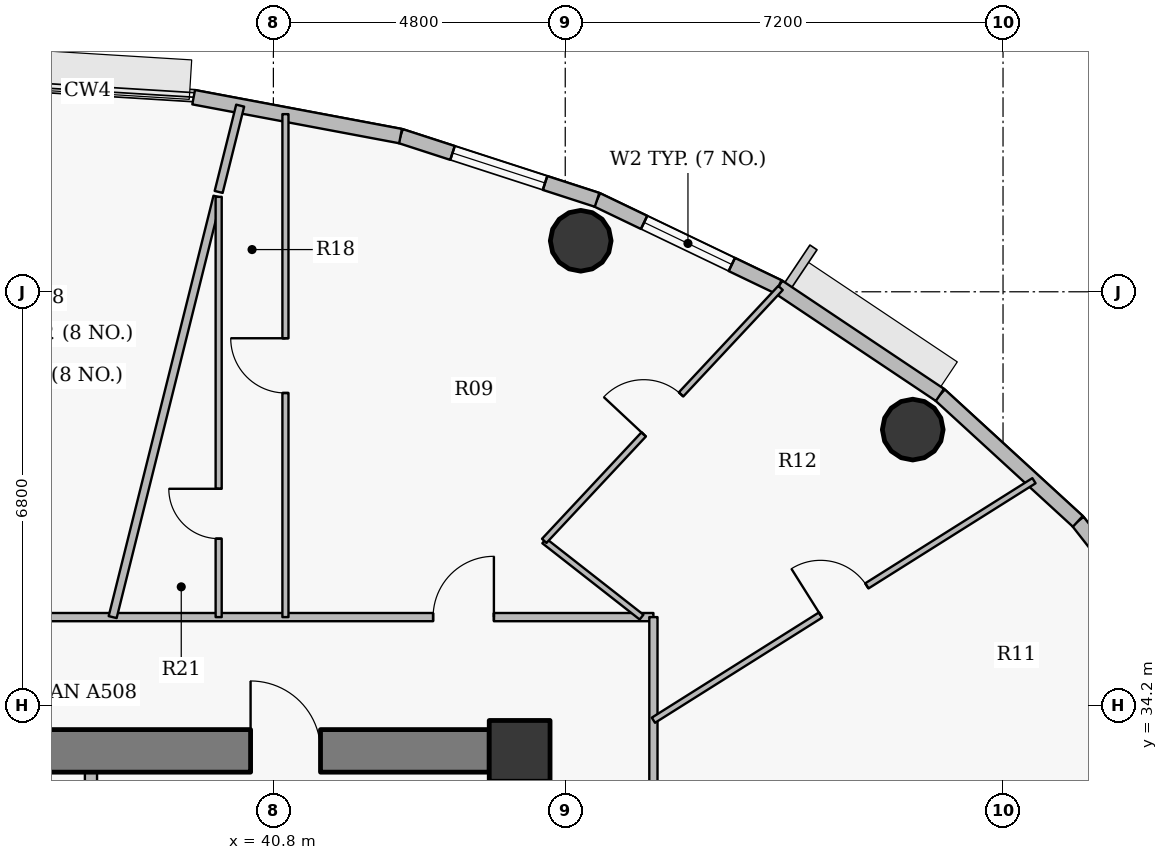
"""IFC4 building model, lengths in metres.
Left out: names, types, materials, properties, quantities, classifications, styles, units other than length and angle.
Written with IfcOpenShell. Run it as: python <this file> out.ifc"""

import sys

from ifc_helpers import new_model, si_unit, direction, frame, frame_2d, origin, origin_2d, place, context, subcontext, project, spatial, rectangle, hollow_circle, extrude, source, transform, mapped, element, fill, save


model = new_model("IFC4")
c1 = context("Model", 3, precision=1e-05, world=origin(), true_north=direction((0.0, 1.0)))
c2 = subcontext(c1, "Body", "Model", "MODEL_VIEW")
j1 = project(units=[si_unit("LENGTHUNIT", "METRE"), si_unit("PLANEANGLEUNIT", "RADIAN")], contexts=[c1])
p1 = place(None, origin())
s1 = spatial("IfcSite", under=j1, at=p1, CompositionType="ELEMENT")
p2 = place(p1, origin())
s2 = spatial("IfcBuilding", under=s1, at=p2, CompositionType="ELEMENT")
p3 = place(p2, frame((0.0, 0.0, 295.5)))
s3 = spatial("IfcBuildingStorey", under=s2, at=p3, CompositionType="ELEMENT", Elevation=295.5)
p4 = place(p3, frame((44.85, 33.45, 0.0), z_axis=(0.0, 0.0, 1.0), x_axis=(1.0, 0.0, 0.0)))
e1 = element("IfcColumn", 1, at=p4, inside=s3, PredefinedType="COLUMN", context=c2, shape_type="SweptSolid", body=[
    extrude(rectangle(XDim=1.0, YDim=1.0, at=origin_2d()), origin(), (0.0, 0.0, 1.0), 3.75),
])
p5 = place(p3, frame((27.65, 33.45, 0.0), z_axis=(0.0, 0.0, 1.0), x_axis=(1.0, 0.0, 0.0)))
e2 = element("IfcWall", 2, at=p5, inside=s3, PredefinedType="SHEAR", context=c2, shape_type="SweptSolid", body=[
    extrude(rectangle(XDim=16.7, YDim=0.7, at=frame_2d((8.35, 0.0))), origin(), (0.0, 0.0, 1.0), 3.05),
])
p6 = place(p5, frame((12.775, 0.0, 0.0)))
e3 = element("IfcOpeningElement", 3, at=p6, cuts=e2, PredefinedType="OPENING", context=c2, shape_type="SweptSolid", body=[
    extrude(rectangle(XDim=1.15, YDim=2.15, at=origin_2d()), frame((0.575, 0.36, 1.075), z_axis=(0.0, -1.0, 0.0), x_axis=(1.0, 0.0, 0.0)), (0.0, 0.0, 1.0), 0.72),
])
for number, where, z_axis, x_axis in (
    (4, (51.315, 38.733, 0.0), (0.0, 0.0, 1.0), (1.0, 0.0, 0.0)),
    (5, (45.854, 41.839, 0.0), (0.0, 0.0, 1.0), (1.0, 0.0, 0.0)),
):
    element("IfcColumn", number, at=place(p3, frame(where, z_axis=z_axis, x_axis=x_axis)), inside=s3, PredefinedType="COLUMN", context=c2, shape_type="SweptSolid", body=[
        extrude(hollow_circle(Radius=0.5, WallThickness=0.032, at=origin_2d()), origin(), (0.0, 0.0, 1.0), 3.75),
    ])
p7 = place(p3, frame((54.03, 37.225, 0.0), z_axis=(0.0, 0.0, 1.0), x_axis=(0.616337186556, -0.787482363275, 0.0)))
e6 = element("IfcWall", 6, at=p7, inside=s3, PredefinedType="SOLIDWALL", context=c2, shape_type="SweptSolid", body=[
    extrude(rectangle(XDim=2.958, YDim=0.24, at=frame_2d((1.479, 0.0))), origin(), (0.0, 0.0, 1.0), 3.5),
])
p8 = place(p7, frame((0.854, 0.0, 0.9)))
e7 = element("IfcOpeningElement", 7, at=p8, cuts=e6, PredefinedType="OPENING", context=c2, shape_type="SweptSolid", body=[
    extrude(rectangle(XDim=1.25, YDim=1.65, at=origin_2d()), frame((0.625, 0.13, 0.825), z_axis=(0.0, -1.0, 0.0), x_axis=(1.0, 0.0, 0.0)), (0.0, 0.0, 1.0), 0.26),
])
p9 = place(p3, frame((51.762, 39.304, 0.0), z_axis=(0.0, 0.0, 1.0), x_axis=(0.737068506972, -0.675818034703, 0.0)))
e8 = element("IfcWall", 8, at=p9, inside=s3, PredefinedType="SOLIDWALL", context=c2, shape_type="SweptSolid", body=[
    extrude(rectangle(XDim=3.077, YDim=0.24, at=frame_2d((1.539, 0.0))), origin(), (0.0, 0.0, 1.0), 3.5),
])
p10 = place(p3, frame((49.104, 41.082, 0.0), z_axis=(0.0, 0.0, 1.0), x_axis=(0.831250592635, -0.55589787933, 0.0)))
e9 = element("IfcWall", 9, at=p10, inside=s3, PredefinedType="SOLIDWALL", context=c2, shape_type="SweptSolid", body=[
    extrude(rectangle(XDim=3.197, YDim=0.24, at=frame_2d((1.599, 0.0))), origin(), (0.0, 0.0, 1.0), 3.5),
])
p11 = place(p3, frame((46.123, 42.512, 0.0), z_axis=(0.0, 0.0, 1.0), x_axis=(0.901573741254, -0.43262546051, 0.0)))
e10 = element("IfcWall", 10, at=p11, inside=s3, PredefinedType="SOLIDWALL", context=c2, shape_type="SweptSolid", body=[
    extrude(rectangle(XDim=3.307, YDim=0.24, at=frame_2d((1.653, 0.0))), origin(), (0.0, 0.0, 1.0), 3.5),
])
p12 = place(p11, frame((0.858, 0.0, 0.9)))
e11 = element("IfcOpeningElement", 11, at=p12, cuts=e10, PredefinedType="OPENING", context=c2, shape_type="SweptSolid", body=[
    extrude(rectangle(XDim=1.6, YDim=1.75, at=origin_2d()), frame((0.8, 0.13, 0.875), z_axis=(0.0, -1.0, 0.0), x_axis=(1.0, 0.0, 0.0)), (0.0, 0.0, 1.0), 0.26),
])
p13 = place(p3, frame((42.891, 43.56, 0.0), z_axis=(0.0, 0.0, 1.0), x_axis=(0.95123136723, -0.308478339592, 0.0)))
e12 = element("IfcWall", 12, at=p13, inside=s3, PredefinedType="SOLIDWALL", context=c2, shape_type="SweptSolid", body=[
    extrude(rectangle(XDim=3.398, YDim=0.24, at=frame_2d((1.699, 0.0))), origin(), (0.0, 0.0, 1.0), 3.5),
])
p14 = place(p13, frame((0.899, 0.0, 0.9)))
e13 = element("IfcOpeningElement", 13, at=p14, cuts=e12, PredefinedType="OPENING", context=c2, shape_type="SweptSolid", body=[
    extrude(rectangle(XDim=1.6, YDim=1.75, at=origin_2d()), frame((0.8, 0.13, 0.875), z_axis=(0.0, -1.0, 0.0), x_axis=(1.0, 0.0, 0.0)), (0.0, 0.0, 1.0), 0.26),
])
p15 = place(p3, frame((39.489, 44.2, 0.0), z_axis=(0.0, 0.0, 1.0), x_axis=(0.982782655757, -0.184765395959, 0.0)))
e14 = element("IfcWall", 14, at=p15, inside=s3, PredefinedType="SOLIDWALL", context=c2, shape_type="SweptSolid", body=[
    extrude(rectangle(XDim=3.462, YDim=0.24, at=frame_2d((1.731, 0.0))), origin(), (0.0, 0.0, 1.0), 3.5),
])
p16 = place(p3, frame((36.95, 35.65, 0.0), z_axis=(0.0, 0.0, 1.0), x_axis=(1.0, 0.0, 0.0)))
e15 = element("IfcWall", 15, at=p16, inside=s3, PredefinedType="PARTITIONING", context=c2, shape_type="SweptSolid", body=[
    extrude(rectangle(XDim=10.1, YDim=0.135, at=frame_2d((5.05, 0.0))), origin(), (0.0, 0.0, 1.0), 3.035),
])
p17 = place(p16, frame((6.477, 0.0, 0.0)))
e16 = element("IfcOpeningElement", 16, at=p17, cuts=e15, PredefinedType="OPENING", context=c2, shape_type="SweptSolid", body=[
    extrude(rectangle(XDim=1.0, YDim=2.15, at=origin_2d()), frame((0.5, 0.078, 1.075), z_axis=(0.0, -1.0, 0.0), x_axis=(1.0, 0.0, 0.0)), (0.0, 0.0, 1.0), 0.155),
])
p18 = place(p3, frame((37.8, 31.05, 0.0), z_axis=(0.0, 0.0, 1.0), x_axis=(0.0, 1.0, 0.0)))
e17 = element("IfcWall", 17, at=p18, inside=s3, PredefinedType="PARTITIONING", context=c2, shape_type="SweptSolid", body=[
    extrude(rectangle(XDim=2.05, YDim=0.2, at=frame_2d((1.025, 0.0))), origin(), (0.0, 0.0, 1.0), 3.085),
])
p19 = place(p3, frame((38.157, 35.65, 0.0), z_axis=(0.0, 0.0, 1.0), x_axis=(0.241898679066, 0.970301514513, 0.0)))
e18 = element("IfcWall", 18, at=p19, inside=s3, PredefinedType="PARTITIONING", context=c2, shape_type="SweptSolid", body=[
    extrude(rectangle(XDim=7.125, YDim=0.135, at=frame_2d((3.563, 0.0))), origin(), (0.0, 0.0, 1.0), 3.5),
])
p20 = place(p3, frame((39.9, 35.65, 0.0), z_axis=(0.0, 0.0, 1.0), x_axis=(0.0, 1.0, 0.0)))
e19 = element("IfcWall", 19, at=p20, inside=s3, PredefinedType="PARTITIONING", context=c2, shape_type="SweptSolid", body=[
    extrude(rectangle(XDim=6.911, YDim=0.1, at=frame_2d((3.456, 0.0))), origin(), (0.0, 0.0, 1.0), 3.5),
])
p21 = place(p20, frame((1.29, 0.0, 0.0)))
e20 = element("IfcOpeningElement", 20, at=p21, cuts=e19, PredefinedType="OPENING", context=c2, shape_type="SweptSolid", body=[
    extrude(rectangle(XDim=0.82, YDim=2.1, at=origin_2d()), frame((0.41, 0.06, 1.05), z_axis=(0.0, -1.0, 0.0), x_axis=(1.0, 0.0, 0.0)), (0.0, 0.0, 1.0), 0.12),
])
p22 = place(p3, frame((39.9, 42.642, 0.0), z_axis=(0.0, 0.0, 1.0), x_axis=(0.241985841386, 0.970279780563, 0.0)))
e21 = element("IfcWall", 21, at=p22, inside=s3, PredefinedType="PARTITIONING", context=c2, shape_type="SweptSolid", body=[
    extrude(rectangle(XDim=1.463, YDim=0.135, at=frame_2d((0.731, 0.0))), origin(), (0.0, 0.0, 1.0), 2.985),
])
p23 = place(p3, frame((40.998, 35.65, 0.0), z_axis=(0.0, 0.0, 1.0), x_axis=(0.0, 1.0, 0.0)))
e22 = element("IfcWall", 22, at=p23, inside=s3, PredefinedType="PARTITIONING", context=c2, shape_type="SweptSolid", body=[
    extrude(rectangle(XDim=8.271, YDim=0.1, at=frame_2d((4.136, 0.0))), origin(), (0.0, 0.0, 1.0), 2.985),
])
p24 = place(p23, frame((3.686, 0.0, 0.0)))
e23 = element("IfcOpeningElement", 23, at=p24, cuts=e22, PredefinedType="OPENING", context=c2, shape_type="SweptSolid", body=[
    extrude(rectangle(XDim=0.9, YDim=2.1, at=origin_2d()), frame((0.45, 0.06, 1.05), z_axis=(0.0, -1.0, 0.0), x_axis=(1.0, 0.0, 0.0)), (0.0, 0.0, 1.0), 0.12),
])
p25 = place(p3, frame((45.254, 36.904, 0.0), z_axis=(0.0, 0.0, 1.0), x_axis=(0.787350433025, -0.616505714179, 0.0)))
e24 = element("IfcWall", 24, at=p25, inside=s3, PredefinedType="PARTITIONING", context=c2, shape_type="SweptSolid", body=[
    extrude(rectangle(XDim=2.033, YDim=0.1, at=frame_2d((1.017, 0.0))), origin(), (0.0, 0.0, 1.0), 3.5),
])
p26 = place(p3, frame((45.254, 36.904, 0.0), z_axis=(0.0, 0.0, 1.0), x_axis=(0.682727638106, 0.73067295842, 0.0)))
e25 = element("IfcWall", 25, at=p26, inside=s3, PredefinedType="PARTITIONING", context=c2, shape_type="SweptSolid", body=[
    extrude(rectangle(XDim=5.693, YDim=0.1, at=frame_2d((2.846, 0.0))), origin(), (0.0, 0.0, 1.0), 2.985),
])
p27 = place(p26, frame((2.396, 0.0, 0.0)))
e26 = element("IfcOpeningElement", 26, at=p27, cuts=e25, PredefinedType="OPENING", context=c2, shape_type="SweptSolid", body=[
    extrude(rectangle(XDim=0.9, YDim=2.1, at=origin_2d()), frame((0.45, 0.06, 1.05), z_axis=(0.0, -1.0, 0.0), x_axis=(1.0, 0.0, 0.0)), (0.0, 0.0, 1.0), 0.12),
])
p28 = place(p3, frame((47.05, 18.35, 0.0), z_axis=(0.0, 0.0, 1.0), x_axis=(0.0, 1.0, 0.0)))
e27 = element("IfcWall", 27, at=p28, inside=s3, PredefinedType="PARTITIONING", context=c2, shape_type="SweptSolid", body=[
    extrude(rectangle(XDim=17.3, YDim=0.135, at=frame_2d((8.65, 0.0))), origin(), (0.0, 0.0, 1.0), 3.035),
])
p29 = place(p28, frame((6.155, 0.0, 0.0)))
e28 = element("IfcOpeningElement", 28, at=p29, cuts=e27, PredefinedType="OPENING", context=c2, shape_type="SweptSolid", body=[
    extrude(rectangle(XDim=1.0, YDim=2.15, at=origin_2d()), frame((0.5, 0.078, 1.075), z_axis=(0.0, -1.0, 0.0), x_axis=(1.0, 0.0, 0.0)), (0.0, 0.0, 1.0), 0.155),
])
p30 = place(p3, frame((47.05, 30.565, 0.0), z_axis=(0.0, 0.0, 1.0), x_axis=(0.951682976888, 0.307082255269, 0.0)))
e29 = element("IfcWall", 29, at=p30, inside=s3, PredefinedType="PARTITIONING", context=c2, shape_type="SweptSolid", body=[
    extrude(rectangle(XDim=9.963, YDim=0.135, at=frame_2d((4.981, 0.0))), origin(), (0.0, 0.0, 1.0), 2.985),
])
p31 = place(p3, frame((47.05, 33.954, 0.0), z_axis=(0.0, 0.0, 1.0), x_axis=(0.846339777122, 0.532643390704, 0.0)))
e30 = element("IfcWall", 30, at=p31, inside=s3, PredefinedType="PARTITIONING", context=c2, shape_type="SweptSolid", body=[
    extrude(rectangle(XDim=7.395, YDim=0.1, at=frame_2d((3.698, 0.0))), origin(), (0.0, 0.0, 1.0), 2.985),
])
p32 = place(p31, frame((3.248, 0.0, 0.0)))
e31 = element("IfcOpeningElement", 31, at=p32, cuts=e30, PredefinedType="OPENING", context=c2, shape_type="SweptSolid", body=[
    extrude(rectangle(XDim=0.9, YDim=2.1, at=origin_2d()), frame((0.45, 0.06, 1.05), z_axis=(0.0, -1.0, 0.0), x_axis=(1.0, 0.0, 0.0)), (0.0, 0.0, 1.0), 0.12),
])
p33 = place(p3, frame((45.2, 33.8, 0.0), z_axis=(0.0, 0.0, 1.0), x_axis=(-1.0, 0.0, 0.0)))
e32 = element("IfcWall", 32, at=p33, inside=s3, PredefinedType="PARTITIONING", context=c2, shape_type="SweptSolid", body=[
    extrude(rectangle(XDim=0.84, YDim=0.135, at=frame_2d((0.42, 0.0))), origin(), (0.0, 0.0, 1.0), 3.035),
])
p34 = place(p3, frame((45.2, 32.96, 0.0), z_axis=(0.0, 0.0, 1.0), x_axis=(0.0, 1.0, 0.0)))
e33 = element("IfcWall", 33, at=p34, inside=s3, PredefinedType="PARTITIONING", context=c2, shape_type="SweptSolid", body=[
    extrude(rectangle(XDim=0.532, YDim=0.135, at=frame_2d((0.266, 0.0))), origin(), (0.0, 0.0, 1.0), 3.5),
])
m1 = source(origin(), c2, "Body", "SweptSolid", [
    extrude(rectangle(XDim=1.6, YDim=1.75, at=origin_2d()), frame((0.8, 0.03, 0.875), z_axis=(0.0, -1.0, 0.0), x_axis=(1.0, 0.0, 0.0)), (0.0, 0.0, 1.0), 0.06),
])
p35 = place(p12, origin())
e34 = element("IfcWindow", 34, at=p35, inside=s3, PartitioningType="DOUBLE_PANEL_VERTICAL", PredefinedType="WINDOW", context=c2, shape_type="MappedRepresentation", body=[
    mapped(m1, transform((0.0, 0.0, 0.0), x_axis=(1.0, 0.0, 0.0), y_axis=(0.0, 1.0, 0.0), z_axis=(0.0, 0.0, 1.0), scale=1.0)),
])
fill(e11, e34)
p36 = place(p14, origin())
e35 = element("IfcWindow", 35, at=p36, inside=s3, PartitioningType="DOUBLE_PANEL_VERTICAL", PredefinedType="WINDOW", context=c2, shape_type="MappedRepresentation", body=[
    mapped(m1, transform((0.0, 0.0, 0.0), x_axis=(1.0, 0.0, 0.0), y_axis=(0.0, 1.0, 0.0), z_axis=(0.0, 0.0, 1.0), scale=1.0)),
])
fill(e13, e35)
m2 = source(origin(), c2, "Body", "SweptSolid", [
    extrude(rectangle(XDim=1.15, YDim=2.15, at=origin_2d()), frame((0.575, 0.025, 1.075), z_axis=(0.0, -1.0, 0.0), x_axis=(1.0, 0.0, 0.0)), (0.0, 0.0, 1.0), 0.05),
])
p37 = place(p6, origin())
e36 = element("IfcDoor", 36, at=p37, inside=s3, OperationType="SINGLE_SWING_LEFT", PredefinedType="DOOR", context=c2, shape_type="MappedRepresentation", body=[
    mapped(m2, transform((0.0, 0.0, 0.0), x_axis=(1.0, 0.0, 0.0), y_axis=(0.0, 1.0, 0.0), z_axis=(0.0, 0.0, 1.0), scale=1.0)),
])
fill(e3, e36)
m3 = source(origin(), c2, "Body", "SweptSolid", [
    extrude(rectangle(XDim=1.0, YDim=2.15, at=origin_2d()), frame((0.5, 0.025, 1.075), z_axis=(0.0, -1.0, 0.0), x_axis=(1.0, 0.0, 0.0)), (0.0, 0.0, 1.0), 0.05),
])
p38 = place(p17, origin())
e37 = element("IfcDoor", 37, at=p38, inside=s3, OperationType="SINGLE_SWING_RIGHT", PredefinedType="DOOR", context=c2, shape_type="MappedRepresentation", body=[
    mapped(m3, transform((0.0, 0.0, 0.0), x_axis=(1.0, 0.0, 0.0), y_axis=(0.0, 1.0, 0.0), z_axis=(0.0, 0.0, 1.0), scale=1.0)),
])
fill(e16, e37)
m4 = source(origin(), c2, "Body", "SweptSolid", [
    extrude(rectangle(XDim=0.9, YDim=2.1, at=origin_2d()), frame((0.45, 0.025, 1.05), z_axis=(0.0, -1.0, 0.0), x_axis=(1.0, 0.0, 0.0)), (0.0, 0.0, 1.0), 0.05),
])
p39 = place(p27, origin())
e38 = element("IfcDoor", 38, at=p39, inside=s3, OperationType="SINGLE_SWING_LEFT", PredefinedType="DOOR", context=c2, shape_type="MappedRepresentation", body=[
    mapped(m4, transform((0.0, 0.0, 0.0), x_axis=(1.0, 0.0, 0.0), y_axis=(0.0, 1.0, 0.0), z_axis=(0.0, 0.0, 1.0), scale=1.0)),
])
fill(e26, e38)
p40 = place(p24, origin())
e39 = element("IfcDoor", 39, at=p40, inside=s3, OperationType="SINGLE_SWING_RIGHT", PredefinedType="DOOR", context=c2, shape_type="MappedRepresentation", body=[
    mapped(m4, transform((0.0, 0.0, 0.0), x_axis=(1.0, 0.0, 0.0), y_axis=(0.0, 1.0, 0.0), z_axis=(0.0, 0.0, 1.0), scale=1.0)),
])
fill(e23, e39)
p41 = place(p32, origin())
e40 = element("IfcDoor", 40, at=p41, inside=s3, OperationType="SINGLE_SWING_LEFT", PredefinedType="DOOR", context=c2, shape_type="MappedRepresentation", body=[
    mapped(m4, transform((0.0, 0.0, 0.0), x_axis=(1.0, 0.0, 0.0), y_axis=(0.0, 1.0, 0.0), z_axis=(0.0, 0.0, 1.0), scale=1.0)),
])
fill(e31, e40)
m5 = source(origin(), c2, "Body", "SweptSolid", [
    extrude(rectangle(XDim=0.82, YDim=2.1, at=origin_2d()), frame((0.41, 0.025, 1.05), z_axis=(0.0, -1.0, 0.0), x_axis=(1.0, 0.0, 0.0)), (0.0, 0.0, 1.0), 0.05),
])
p42 = place(p21, origin())
e41 = element("IfcDoor", 41, at=p42, inside=s3, OperationType="SINGLE_SWING_RIGHT", PredefinedType="DOOR", context=c2, shape_type="MappedRepresentation", body=[
    mapped(m5, transform((0.0, 0.0, 0.0), x_axis=(1.0, 0.0, 0.0), y_axis=(0.0, 1.0, 0.0), z_axis=(0.0, 0.0, 1.0), scale=1.0)),
])
fill(e20, e41)
save(model, sys.argv[1])
